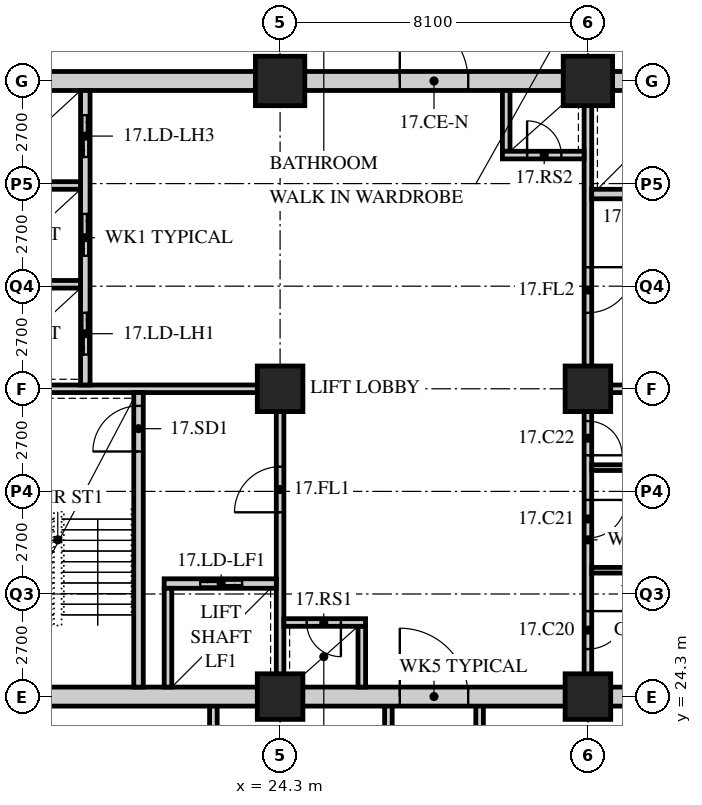
"""IFC4 building model, lengths in metres.
Left out: names, types, materials, properties, quantities, classifications, styles, units other than length and angle.
Written with IfcOpenShell. Run it as: python <this file> out.ifc"""

import sys

from ifc_helpers import new_model, si_unit, direction, frame, frame_2d, origin, origin_2d, place, context, subcontext, project, spatial, rectangle, hollow_rectangle, extrude, element, fill, save


model = new_model("IFC4")
c1 = context("Model", 3, precision=1e-05, world=origin(), true_north=direction((0.0, 1.0)))
c2 = subcontext(c1, "Body", "Model", "MODEL_VIEW")
j1 = project(units=[si_unit("LENGTHUNIT", "METRE"), si_unit("PLANEANGLEUNIT", "RADIAN")], contexts=[c1])
p1 = place(None, origin())
s1 = spatial("IfcSite", under=j1, at=p1, CompositionType="ELEMENT")
p2 = place(p1, origin())
s2 = spatial("IfcBuilding", under=s1, at=p2, CompositionType="ELEMENT")
p3 = place(p2, frame((0.0, 0.0, 70.4)))
s3 = spatial("IfcBuildingStorey", under=s2, at=p3, CompositionType="ELEMENT", Elevation=70.4)
for number, where, z_axis, x_axis in (
    (1, (24.3, 24.3, 0.0), (0.0, 0.0, 1.0), (1.0, 0.0, 0.0)),
    (2, (24.3, 32.4, 0.0), (0.0, 0.0, 1.0), (1.0, 0.0, 0.0)),
):
    element("IfcColumn", number, at=place(p3, frame(where, z_axis=z_axis, x_axis=x_axis)), inside=s3, PredefinedType="COLUMN", context=c2, shape_type="SweptSolid", body=[
        extrude(hollow_rectangle(XDim=1.2, YDim=1.2, WallThickness=0.12, at=origin_2d()), origin(), (0.0, 0.0, 1.0), 3.4),
    ])
p4 = place(p3, frame((24.3, 40.5, 0.0), z_axis=(0.0, 0.0, 1.0), x_axis=(1.0, 0.0, 0.0)))
e3 = element("IfcColumn", 3, at=p4, inside=s3, PredefinedType="COLUMN", context=c2, shape_type="SweptSolid", body=[
    extrude(hollow_rectangle(XDim=1.3, YDim=1.3, WallThickness=0.13, at=origin_2d()), origin(), (0.0, 0.0, 1.0), 3.4),
])
for number, where, z_axis, x_axis in (
    (4, (32.4, 24.3, 0.0), (0.0, 0.0, 1.0), (1.0, 0.0, 0.0)),
    (5, (32.4, 32.4, 0.0), (0.0, 0.0, 1.0), (1.0, 0.0, 0.0)),
):
    element("IfcColumn", number, at=place(p3, frame(where, z_axis=z_axis, x_axis=x_axis)), inside=s3, PredefinedType="COLUMN", context=c2, shape_type="SweptSolid", body=[
        extrude(hollow_rectangle(XDim=1.2, YDim=1.2, WallThickness=0.12, at=origin_2d()), origin(), (0.0, 0.0, 1.0), 3.4),
    ])
p5 = place(p3, frame((32.4, 40.5, 0.0), z_axis=(0.0, 0.0, 1.0), x_axis=(1.0, 0.0, 0.0)))
e6 = element("IfcColumn", 6, at=p5, inside=s3, PredefinedType="COLUMN", context=c2, shape_type="SweptSolid", body=[
    extrude(hollow_rectangle(XDim=1.3, YDim=1.3, WallThickness=0.13, at=origin_2d()), origin(), (0.0, 0.0, 1.0), 3.4),
])
for number, where, z_axis, x_axis in (
    (7, (22.545, 13.95, 0.0), (0.0, 0.0, 1.0), (0.0, 1.0, 0.0)),
    (8, (27.15, 13.95, 0.0), (0.0, 0.0, 1.0), (0.0, 1.0, 0.0)),
    (9, (29.55, 13.95, 0.0), (0.0, 0.0, 1.0), (0.0, 1.0, 0.0)),
):
    element("IfcWall", number, at=place(p3, frame(where, z_axis=z_axis, x_axis=x_axis)), inside=s3, PredefinedType="SOLIDWALL", context=c2, shape_type="SweptSolid", body=[
        extrude(rectangle(XDim=10.35, YDim=0.2, at=frame_2d((5.175, 0.0))), origin(), (0.0, 0.0, 1.0), 3.19),
    ])
p6 = place(p3, frame((15.95, 24.3, 0.0), z_axis=(0.0, 0.0, 1.0), x_axis=(1.0, 0.0, 0.0)))
e10 = element("IfcWall", 10, at=p6, inside=s3, PredefinedType="SOLIDWALL", context=c2, shape_type="SweptSolid", body=[
    extrude(rectangle(XDim=24.8, YDim=0.5, at=frame_2d((12.4, 0.0))), origin(), (0.0, 0.0, 1.0), 2.54),
])
p7 = place(p6, frame((11.5, 0.0, 0.0)))
e11 = element("IfcOpeningElement", 11, at=p7, cuts=e10, PredefinedType="OPENING", context=c2, shape_type="SweptSolid", body=[
    extrude(rectangle(XDim=1.8, YDim=2.4, at=frame_2d((0.9, 1.2))), frame((0.0, 0.26, 0.0), z_axis=(0.0, -1.0, 0.0), x_axis=(1.0, 0.0, 0.0)), (0.0, 0.0, 1.0), 0.52),
])
p8 = place(p3, frame((15.95, 40.5, 0.0), z_axis=(0.0, 0.0, 1.0), x_axis=(1.0, 0.0, 0.0)))
e12 = element("IfcWall", 12, at=p8, inside=s3, PredefinedType="SOLIDWALL", context=c2, shape_type="SweptSolid", body=[
    extrude(rectangle(XDim=24.8, YDim=0.5, at=frame_2d((12.4, 0.0))), origin(), (0.0, 0.0, 1.0), 2.54),
])
p9 = place(p8, frame((11.5, 0.0, 0.0)))
e13 = element("IfcOpeningElement", 13, at=p9, cuts=e12, PredefinedType="OPENING", context=c2, shape_type="SweptSolid", body=[
    extrude(rectangle(XDim=1.8, YDim=2.4, at=frame_2d((0.9, 1.2))), frame((0.0, 0.26, 0.0), z_axis=(0.0, -1.0, 0.0), x_axis=(1.0, 0.0, 0.0)), (0.0, 0.0, 1.0), 0.52),
])
p10 = place(p3, frame((16.45, 32.4, 0.0), z_axis=(0.0, 0.0, 1.0), x_axis=(1.0, 0.0, 0.0)))
e14 = element("IfcWall", 14, at=p10, inside=s3, PredefinedType="SOLIDWALL", context=c2, shape_type="SweptSolid", body=[
    extrude(rectangle(XDim=7.95, YDim=0.2, at=frame_2d((3.975, 0.0))), origin(), (0.0, 0.0, 1.0), 2.578),
])
p11 = place(p3, frame((24.3, 24.55, 0.0), z_axis=(0.0, 0.0, 1.0), x_axis=(0.0, 1.0, 0.0)))
e15 = element("IfcWall", 15, at=p11, inside=s3, PredefinedType="SOLIDWALL", context=c2, shape_type="SweptSolid", body=[
    extrude(rectangle(XDim=7.75, YDim=0.2, at=frame_2d((3.875, 0.0))), origin(), (0.0, 0.0, 1.0), 2.578),
])
p12 = place(p11, frame((4.6, 0.0, 0.0)))
e16 = element("IfcOpeningElement", 16, at=p12, cuts=e15, PredefinedType="OPENING", context=c2, shape_type="SweptSolid", body=[
    extrude(rectangle(XDim=1.2, YDim=2.1, at=frame_2d((0.6, 1.05))), frame((0.0, 0.11, 0.0), z_axis=(0.0, -1.0, 0.0), x_axis=(1.0, 0.0, 0.0)), (0.0, 0.0, 1.0), 0.22),
])
p13 = place(p3, frame((20.575, 24.55, 0.0), z_axis=(0.0, 0.0, 1.0), x_axis=(0.0, 1.0, 0.0)))
e17 = element("IfcWall", 17, at=p13, inside=s3, PredefinedType="SOLIDWALL", context=c2, shape_type="SweptSolid", body=[
    extrude(rectangle(XDim=7.75, YDim=0.25, at=frame_2d((3.875, 0.0))), origin(), (0.0, 0.0, 1.0), 3.19),
])
p14 = place(p13, frame((6.2, 0.0, 0.0)))
e18 = element("IfcOpeningElement", 18, at=p14, cuts=e17, PredefinedType="OPENING", context=c2, shape_type="SweptSolid", body=[
    extrude(rectangle(XDim=1.2, YDim=2.1, at=frame_2d((0.6, 1.05))), frame((0.0, 0.135, 0.0), z_axis=(0.0, -1.0, 0.0), x_axis=(1.0, 0.0, 0.0)), (0.0, 0.0, 1.0), 0.27),
])
p15 = place(p3, frame((21.25, 27.275, 0.0), z_axis=(0.0, 0.0, 1.0), x_axis=(1.0, 0.0, 0.0)))
e19 = element("IfcWall", 19, at=p15, inside=s3, PredefinedType="SOLIDWALL", context=c2, shape_type="SweptSolid", body=[
    extrude(rectangle(XDim=2.95, YDim=0.25, at=frame_2d((1.475, 0.0))), origin(), (0.0, 0.0, 1.0), 3.19),
])
p16 = place(p15, frame((0.95, 0.0, 0.0)))
e20 = element("IfcOpeningElement", 20, at=p16, cuts=e19, PredefinedType="OPENING", context=c2, shape_type="SweptSolid", body=[
    extrude(rectangle(XDim=1.1, YDim=2.4, at=frame_2d((0.55, 1.2))), frame((0.0, 0.135, 0.0), z_axis=(0.0, -1.0, 0.0), x_axis=(1.0, 0.0, 0.0)), (0.0, 0.0, 1.0), 0.27),
])
p17 = place(p3, frame((21.35, 24.55, 0.0), z_axis=(0.0, 0.0, 1.0), x_axis=(0.0, 1.0, 0.0)))
e21 = element("IfcWall", 21, at=p17, inside=s3, PredefinedType="SOLIDWALL", context=c2, shape_type="SweptSolid", body=[
    extrude(rectangle(XDim=2.6, YDim=0.2, at=frame_2d((1.3, 0.0))), origin(), (0.0, 0.0, 1.0), 3.19),
])
p18 = place(p3, frame((19.175, 32.5, 0.0), z_axis=(0.0, 0.0, 1.0), x_axis=(0.0, 1.0, 0.0)))
e22 = element("IfcWall", 22, at=p18, inside=s3, PredefinedType="SOLIDWALL", context=c2, shape_type="SweptSolid", body=[
    extrude(rectangle(XDim=7.75, YDim=0.25, at=frame_2d((3.875, 0.0))), origin(), (0.0, 0.0, 1.0), 3.19),
])
p19 = place(p18, frame((0.8, 0.0, 0.0)))
e23 = element("IfcOpeningElement", 23, at=p19, cuts=e22, PredefinedType="OPENING", context=c2, shape_type="SweptSolid", body=[
    extrude(rectangle(XDim=1.1, YDim=2.4, at=frame_2d((0.55, 1.2))), frame((0.0, 0.135, 0.0), z_axis=(0.0, -1.0, 0.0), x_axis=(1.0, 0.0, 0.0)), (0.0, 0.0, 1.0), 0.27),
])
p20 = place(p18, frame((3.4, 0.0, 0.0)))
e24 = element("IfcOpeningElement", 24, at=p20, cuts=e22, PredefinedType="OPENING", context=c2, shape_type="SweptSolid", body=[
    extrude(rectangle(XDim=1.1, YDim=2.4, at=frame_2d((0.55, 1.2))), frame((0.0, 0.135, 0.0), z_axis=(0.0, -1.0, 0.0), x_axis=(1.0, 0.0, 0.0)), (0.0, 0.0, 1.0), 0.27),
])
p21 = place(p18, frame((6.0, 0.0, 0.0)))
e25 = element("IfcOpeningElement", 25, at=p21, cuts=e22, PredefinedType="OPENING", context=c2, shape_type="SweptSolid", body=[
    extrude(rectangle(XDim=1.1, YDim=2.4, at=frame_2d((0.55, 1.2))), frame((0.0, 0.135, 0.0), z_axis=(0.0, -1.0, 0.0), x_axis=(1.0, 0.0, 0.0)), (0.0, 0.0, 1.0), 0.27),
])
for number, where, z_axis, x_axis in (
    (26, (16.45, 35.15, 0.0), (0.0, 0.0, 1.0), (1.0, 0.0, 0.0)),
    (27, (16.45, 37.75, 0.0), (0.0, 0.0, 1.0), (1.0, 0.0, 0.0)),
):
    element("IfcWall", number, at=place(p3, frame(where, z_axis=z_axis, x_axis=x_axis)), inside=s3, PredefinedType="SOLIDWALL", context=c2, shape_type="SweptSolid", body=[
        extrude(rectangle(XDim=2.6, YDim=0.2, at=frame_2d((1.3, 0.0))), origin(), (0.0, 0.0, 1.0), 3.19),
    ])
p22 = place(p3, frame((26.45, 24.55, 0.0), z_axis=(0.0, 0.0, 1.0), x_axis=(0.0, 1.0, 0.0)))
e28 = element("IfcWall", 28, at=p22, inside=s3, PredefinedType="SOLIDWALL", context=c2, shape_type="SweptSolid", body=[
    extrude(rectangle(XDim=1.6, YDim=0.2, at=frame_2d((0.8, 0.0))), origin(), (0.0, 0.0, 1.0), 3.19),
])
p23 = place(p3, frame((24.4, 26.25, 0.0), z_axis=(0.0, 0.0, 1.0), x_axis=(1.0, 0.0, 0.0)))
e29 = element("IfcWall", 29, at=p23, inside=s3, PredefinedType="SOLIDWALL", context=c2, shape_type="SweptSolid", body=[
    extrude(rectangle(XDim=2.15, YDim=0.2, at=frame_2d((1.075, 0.0))), origin(), (0.0, 0.0, 1.0), 3.19),
])
p24 = place(p23, frame((0.6, 0.0, 0.0)))
e30 = element("IfcOpeningElement", 30, at=p24, cuts=e29, PredefinedType="OPENING", context=c2, shape_type="SweptSolid", body=[
    extrude(rectangle(XDim=0.9, YDim=2.1, at=frame_2d((0.45, 1.05))), frame((0.0, 0.11, 0.0), z_axis=(0.0, -1.0, 0.0), x_axis=(1.0, 0.0, 0.0)), (0.0, 0.0, 1.0), 0.22),
])
p25 = place(p3, frame((32.3, 32.4, 0.0), z_axis=(0.0, 0.0, 1.0), x_axis=(1.0, 0.0, 0.0)))
e31 = element("IfcWall", 31, at=p25, inside=s3, PredefinedType="SOLIDWALL", context=c2, shape_type="SweptSolid", body=[
    extrude(rectangle(XDim=7.95, YDim=0.2, at=frame_2d((3.975, 0.0))), origin(), (0.0, 0.0, 1.0), 2.578),
])
p26 = place(p3, frame((32.4, 32.5, 0.0), z_axis=(0.0, 0.0, 1.0), x_axis=(0.0, 1.0, 0.0)))
e32 = element("IfcWall", 32, at=p26, inside=s3, PredefinedType="SOLIDWALL", context=c2, shape_type="SweptSolid", body=[
    extrude(rectangle(XDim=7.75, YDim=0.2, at=frame_2d((3.875, 0.0))), origin(), (0.0, 0.0, 1.0), 2.578),
])
p27 = place(p26, frame((1.9, 0.0, 0.0)))
e33 = element("IfcOpeningElement", 33, at=p27, cuts=e32, PredefinedType="OPENING", context=c2, shape_type="SweptSolid", body=[
    extrude(rectangle(XDim=1.2, YDim=2.1, at=frame_2d((0.6, 1.05))), frame((0.0, 0.11, 0.0), z_axis=(0.0, -1.0, 0.0), x_axis=(1.0, 0.0, 0.0)), (0.0, 0.0, 1.0), 0.22),
])
p28 = place(p3, frame((32.5, 37.525, 0.0), z_axis=(0.0, 0.0, 1.0), x_axis=(1.0, 0.0, 0.0)))
e34 = element("IfcWall", 34, at=p28, inside=s3, PredefinedType="SOLIDWALL", context=c2, shape_type="SweptSolid", body=[
    extrude(rectangle(XDim=2.95, YDim=0.25, at=frame_2d((1.475, 0.0))), origin(), (0.0, 0.0, 1.0), 3.19),
])
p29 = place(p28, frame((0.9, 0.0, 0.0)))
e35 = element("IfcOpeningElement", 35, at=p29, cuts=e34, PredefinedType="OPENING", context=c2, shape_type="SweptSolid", body=[
    extrude(rectangle(XDim=1.1, YDim=2.4, at=frame_2d((0.55, 1.2))), frame((0.0, 0.135, 0.0), z_axis=(0.0, -1.0, 0.0), x_axis=(1.0, 0.0, 0.0)), (0.0, 0.0, 1.0), 0.27),
])
p30 = place(p3, frame((30.25, 38.65, 0.0), z_axis=(0.0, 0.0, 1.0), x_axis=(0.0, 1.0, 0.0)))
e36 = element("IfcWall", 36, at=p30, inside=s3, PredefinedType="SOLIDWALL", context=c2, shape_type="SweptSolid", body=[
    extrude(rectangle(XDim=1.6, YDim=0.2, at=frame_2d((0.8, 0.0))), origin(), (0.0, 0.0, 1.0), 3.19),
])
p31 = place(p3, frame((30.15, 38.55, 0.0), z_axis=(0.0, 0.0, 1.0), x_axis=(1.0, 0.0, 0.0)))
e37 = element("IfcWall", 37, at=p31, inside=s3, PredefinedType="SOLIDWALL", context=c2, shape_type="SweptSolid", body=[
    extrude(rectangle(XDim=2.15, YDim=0.2, at=frame_2d((1.075, 0.0))), origin(), (0.0, 0.0, 1.0), 3.19),
])
p32 = place(p31, frame((0.65, 0.0, 0.0)))
e38 = element("IfcOpeningElement", 38, at=p32, cuts=e37, PredefinedType="OPENING", context=c2, shape_type="SweptSolid", body=[
    extrude(rectangle(XDim=0.9, YDim=2.1, at=frame_2d((0.45, 1.05))), frame((0.0, 0.11, 0.0), z_axis=(0.0, -1.0, 0.0), x_axis=(1.0, 0.0, 0.0)), (0.0, 0.0, 1.0), 0.22),
])
p33 = place(p3, frame((32.4, 24.55, 0.0), z_axis=(0.0, 0.0, 1.0), x_axis=(0.0, 1.0, 0.0)))
e39 = element("IfcWall", 39, at=p33, inside=s3, PredefinedType="PARTITIONING", context=c2, shape_type="SweptSolid", body=[
    extrude(rectangle(XDim=7.75, YDim=0.2, at=frame_2d((3.875, 0.0))), origin(), (0.0, 0.0, 1.0), 2.578),
])
p34 = place(p33, frame((1.0, 0.0, 0.0)))
e40 = element("IfcOpeningElement", 40, at=p34, cuts=e39, PredefinedType="OPENING", context=c2, shape_type="SweptSolid", body=[
    extrude(rectangle(XDim=1.0, YDim=2.1, at=frame_2d((0.5, 1.05))), frame((0.0, 0.11, 0.0), z_axis=(0.0, -1.0, 0.0), x_axis=(1.0, 0.0, 0.0)), (0.0, 0.0, 1.0), 0.22),
])
p35 = place(p33, frame((3.925, 0.0, 0.0)))
e41 = element("IfcOpeningElement", 41, at=p35, cuts=e39, PredefinedType="OPENING", context=c2, shape_type="SweptSolid", body=[
    extrude(rectangle(XDim=1.0, YDim=2.1, at=frame_2d((0.5, 1.05))), frame((0.0, 0.11, 0.0), z_axis=(0.0, -1.0, 0.0), x_axis=(1.0, 0.0, 0.0)), (0.0, 0.0, 1.0), 0.22),
])
p36 = place(p33, frame((6.1, 0.0, 0.0)))
e42 = element("IfcOpeningElement", 42, at=p36, cuts=e39, PredefinedType="OPENING", context=c2, shape_type="SweptSolid", body=[
    extrude(rectangle(XDim=0.9, YDim=2.1, at=frame_2d((0.45, 1.05))), frame((0.0, 0.11, 0.0), z_axis=(0.0, -1.0, 0.0), x_axis=(1.0, 0.0, 0.0)), (0.0, 0.0, 1.0), 0.22),
])
for number, where, z_axis, x_axis in (
    (43, (32.5, 27.625, 0.0), (0.0, 0.0, 1.0), (1.0, 0.0, 0.0)),
    (44, (32.5, 30.325, 0.0), (0.0, 0.0, 1.0), (1.0, 0.0, 0.0)),
):
    element("IfcWall", number, at=place(p3, frame(where, z_axis=z_axis, x_axis=x_axis)), inside=s3, PredefinedType="PARTITIONING", context=c2, shape_type="SweptSolid", body=[
        extrude(rectangle(XDim=4.9, YDim=0.15, at=frame_2d((2.45, 0.0))), origin(), (0.0, 0.0, 1.0), 3.19),
    ])
p37 = place(p34, origin())
e45 = element("IfcDoor", 45, at=p37, inside=s3, OperationType="SINGLE_SWING_LEFT", PredefinedType="DOOR", context=c2, shape_type="SweptSolid", body=[
    extrude(rectangle(XDim=1.0, YDim=2.1, at=frame_2d((0.5, 1.05))), frame((0.0, 0.025, 0.0), z_axis=(0.0, -1.0, 0.0), x_axis=(1.0, 0.0, 0.0)), (0.0, 0.0, 1.0), 0.05),
])
fill(e40, e45)
p38 = place(p35, origin())
e46 = element("IfcDoor", 46, at=p38, inside=s3, OperationType="SINGLE_SWING_LEFT", PredefinedType="DOOR", context=c2, shape_type="SweptSolid", body=[
    extrude(rectangle(XDim=1.0, YDim=2.1, at=frame_2d((0.5, 1.05))), frame((0.0, 0.025, 0.0), z_axis=(0.0, -1.0, 0.0), x_axis=(1.0, 0.0, 0.0)), (0.0, 0.0, 1.0), 0.05),
])
fill(e41, e46)
p39 = place(p36, origin())
e47 = element("IfcDoor", 47, at=p39, inside=s3, OperationType="SINGLE_SWING_RIGHT", PredefinedType="DOOR", context=c2, shape_type="SweptSolid", body=[
    extrude(rectangle(XDim=0.9, YDim=2.1, at=frame_2d((0.45, 1.05))), frame((0.0, 0.025, 0.0), z_axis=(0.0, -1.0, 0.0), x_axis=(1.0, 0.0, 0.0)), (0.0, 0.0, 1.0), 0.05),
])
fill(e42, e47)
p40 = place(p14, origin())
e48 = element("IfcDoor", 48, at=p40, inside=s3, OperationType="SINGLE_SWING_LEFT", PredefinedType="DOOR", context=c2, shape_type="SweptSolid", body=[
    extrude(rectangle(XDim=1.2, YDim=2.1, at=frame_2d((0.6, 1.05))), frame((0.0, 0.025, 0.0), z_axis=(0.0, -1.0, 0.0), x_axis=(1.0, 0.0, 0.0)), (0.0, 0.0, 1.0), 0.05),
])
fill(e18, e48)
p41 = place(p12, origin())
e49 = element("IfcDoor", 49, at=p41, inside=s3, OperationType="SINGLE_SWING_LEFT", PredefinedType="DOOR", context=c2, shape_type="SweptSolid", body=[
    extrude(rectangle(XDim=1.2, YDim=2.1, at=frame_2d((0.6, 1.05))), frame((0.0, 0.025, 0.0), z_axis=(0.0, -1.0, 0.0), x_axis=(1.0, 0.0, 0.0)), (0.0, 0.0, 1.0), 0.05),
])
fill(e16, e49)
p42 = place(p24, origin())
e50 = element("IfcDoor", 50, at=p42, inside=s3, OperationType="SINGLE_SWING_LEFT", PredefinedType="DOOR", context=c2, shape_type="SweptSolid", body=[
    extrude(rectangle(XDim=0.9, YDim=2.1, at=frame_2d((0.45, 1.05))), frame((0.0, 0.025, 0.0), z_axis=(0.0, -1.0, 0.0), x_axis=(1.0, 0.0, 0.0)), (0.0, 0.0, 1.0), 0.05),
])
fill(e30, e50)
p43 = place(p27, origin())
e51 = element("IfcDoor", 51, at=p43, inside=s3, OperationType="SINGLE_SWING_LEFT", PredefinedType="DOOR", context=c2, shape_type="SweptSolid", body=[
    extrude(rectangle(XDim=1.2, YDim=2.1, at=frame_2d((0.6, 1.05))), frame((0.0, 0.025, 0.0), z_axis=(0.0, -1.0, 0.0), x_axis=(1.0, 0.0, 0.0)), (0.0, 0.0, 1.0), 0.05),
])
fill(e33, e51)
p44 = place(p32, origin())
e52 = element("IfcDoor", 52, at=p44, inside=s3, OperationType="SINGLE_SWING_LEFT", PredefinedType="DOOR", context=c2, shape_type="SweptSolid", body=[
    extrude(rectangle(XDim=0.9, YDim=2.1, at=frame_2d((0.45, 1.05))), frame((0.0, 0.025, 0.0), z_axis=(0.0, -1.0, 0.0), x_axis=(1.0, 0.0, 0.0)), (0.0, 0.0, 1.0), 0.05),
])
fill(e38, e52)
p45 = place(p19, origin())
e53 = element("IfcDoor", 53, at=p45, inside=s3, OperationType="DOUBLE_DOOR_SLIDING", PredefinedType="DOOR", context=c2, shape_type="SweptSolid", body=[
    extrude(rectangle(XDim=1.1, YDim=2.4, at=frame_2d((0.55, 1.2))), frame((0.0, 0.025, 0.0), z_axis=(0.0, -1.0, 0.0), x_axis=(1.0, 0.0, 0.0)), (0.0, 0.0, 1.0), 0.05),
])
fill(e23, e53)
p46 = place(p20, origin())
e54 = element("IfcDoor", 54, at=p46, inside=s3, OperationType="DOUBLE_DOOR_SLIDING", PredefinedType="DOOR", context=c2, shape_type="SweptSolid", body=[
    extrude(rectangle(XDim=1.1, YDim=2.4, at=frame_2d((0.55, 1.2))), frame((0.0, 0.025, 0.0), z_axis=(0.0, -1.0, 0.0), x_axis=(1.0, 0.0, 0.0)), (0.0, 0.0, 1.0), 0.05),
])
fill(e24, e54)
p47 = place(p21, origin())
e55 = element("IfcDoor", 55, at=p47, inside=s3, OperationType="DOUBLE_DOOR_SLIDING", PredefinedType="DOOR", context=c2, shape_type="SweptSolid", body=[
    extrude(rectangle(XDim=1.1, YDim=2.4, at=frame_2d((0.55, 1.2))), frame((0.0, 0.025, 0.0), z_axis=(0.0, -1.0, 0.0), x_axis=(1.0, 0.0, 0.0)), (0.0, 0.0, 1.0), 0.05),
])
fill(e25, e55)
p48 = place(p16, origin())
e56 = element("IfcDoor", 56, at=p48, inside=s3, OperationType="DOUBLE_DOOR_SLIDING", PredefinedType="DOOR", context=c2, shape_type="SweptSolid", body=[
    extrude(rectangle(XDim=1.1, YDim=2.4, at=frame_2d((0.55, 1.2))), frame((0.0, 0.025, 0.0), z_axis=(0.0, -1.0, 0.0), x_axis=(1.0, 0.0, 0.0)), (0.0, 0.0, 1.0), 0.05),
])
fill(e20, e56)
p49 = place(p7, origin())
e57 = element("IfcDoor", 57, at=p49, inside=s3, OperationType="DOUBLE_DOOR_SINGLE_SWING", PredefinedType="DOOR", context=c2, shape_type="SweptSolid", body=[
    extrude(rectangle(XDim=1.8, YDim=2.4, at=frame_2d((0.9, 1.2))), frame((0.0, 0.025, 0.0), z_axis=(0.0, -1.0, 0.0), x_axis=(1.0, 0.0, 0.0)), (0.0, 0.0, 1.0), 0.05),
])
fill(e11, e57)
p50 = place(p9, origin())
e58 = element("IfcDoor", 58, at=p50, inside=s3, OperationType="DOUBLE_DOOR_SINGLE_SWING", PredefinedType="DOOR", context=c2, shape_type="SweptSolid", body=[
    extrude(rectangle(XDim=1.8, YDim=2.4, at=frame_2d((0.9, 1.2))), frame((0.0, 0.025, 0.0), z_axis=(0.0, -1.0, 0.0), x_axis=(1.0, 0.0, 0.0)), (0.0, 0.0, 1.0), 0.05),
])
fill(e13, e58)
save(model, sys.argv[1])
